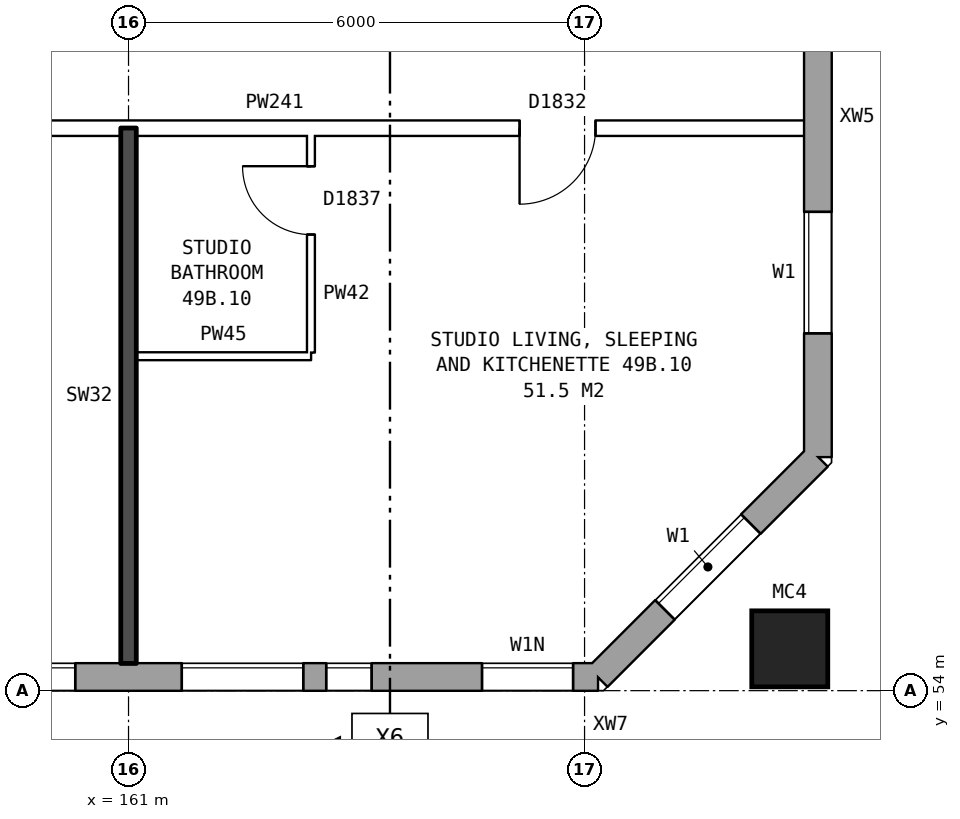
"""IFC4 building model, lengths in metres.
Left out: names, types, materials, properties, quantities, classifications, styles, units other than length and angle.
Written with IfcOpenShell. Run it as: python <this file> out.ifc"""

import sys

from ifc_helpers import new_model, si_unit, direction, frame, frame_2d, origin, origin_2d, place, context, subcontext, project, spatial, rectangle, hollow_rectangle, extrude, element, fill, save


model = new_model("IFC4")
c1 = context("Model", 3, precision=1e-05, world=origin(), true_north=direction((0.0, 1.0)))
c2 = subcontext(c1, "Body", "Model", "MODEL_VIEW")
j1 = project(units=[si_unit("LENGTHUNIT", "METRE"), si_unit("PLANEANGLEUNIT", "RADIAN")], contexts=[c1])
p1 = place(None, origin())
s1 = spatial("IfcSite", under=j1, at=p1, CompositionType="ELEMENT")
p2 = place(p1, origin())
s2 = spatial("IfcBuilding", under=s1, at=p2, CompositionType="ELEMENT")
p3 = place(p2, frame((0.0, 0.0, 175.8)))
s3 = spatial("IfcBuildingStorey", under=s2, at=p3, CompositionType="ELEMENT", Elevation=175.8)
p4 = place(p3, frame((169.7, 54.55, 0.0), z_axis=(0.0, 0.0, 1.0), x_axis=(1.0, 0.0, 0.0)))
e1 = element("IfcColumn", 1, at=p4, inside=s3, PredefinedType="COLUMN", context=c2, shape_type="SweptSolid", body=[
    extrude(hollow_rectangle(XDim=1.0, YDim=1.0, WallThickness=0.055, at=origin_2d()), origin(), (0.0, 0.0, 1.0), 3.1),
])
p5 = place(p3, frame((134.075, 54.18, 0.0), z_axis=(0.0, 0.0, 1.0), x_axis=(1.0, 0.0, 0.0)))
e2 = element("IfcWall", 2, at=p5, inside=s3, PredefinedType="STANDARD", context=c2, shape_type="SweptSolid", body=[
    extrude(rectangle(XDim=33.101, YDim=0.36, at=frame_2d((16.55, 0.0))), origin(), (0.0, 0.0, 1.0), 2.85),
])
p6 = place(p5, frame((0.3, 0.0, 0.8)))
e3 = element("IfcOpeningElement", 3, at=p6, cuts=e2, PredefinedType="OPENING", context=c2, shape_type="SweptSolid", body=[
    extrude(rectangle(XDim=0.6, YDim=1.8, at=frame_2d((0.3, 0.9))), frame((0.0, 0.19, 0.0), z_axis=(0.0, -1.0, 0.0), x_axis=(1.0, 0.0, 0.0)), (0.0, 0.0, 1.0), 0.38),
])
p7 = place(p5, frame((3.625, 0.0, 0.8)))
e4 = element("IfcOpeningElement", 4, at=p7, cuts=e2, PredefinedType="OPENING", context=c2, shape_type="SweptSolid", body=[
    extrude(rectangle(XDim=1.6, YDim=1.8, at=frame_2d((0.8, 0.9))), frame((0.0, 0.19, 0.0), z_axis=(0.0, -1.0, 0.0), x_axis=(1.0, 0.0, 0.0)), (0.0, 0.0, 1.0), 0.38),
])
p8 = place(p5, frame((6.625, 0.0, 0.8)))
e5 = element("IfcOpeningElement", 5, at=p8, cuts=e2, PredefinedType="OPENING", context=c2, shape_type="SweptSolid", body=[
    extrude(rectangle(XDim=1.6, YDim=1.8, at=frame_2d((0.8, 0.9))), frame((0.0, 0.19, 0.0), z_axis=(0.0, -1.0, 0.0), x_axis=(1.0, 0.0, 0.0)), (0.0, 0.0, 1.0), 0.38),
])
p9 = place(p5, frame((9.625, 0.0, 0.8)))
e6 = element("IfcOpeningElement", 6, at=p9, cuts=e2, PredefinedType="OPENING", context=c2, shape_type="SweptSolid", body=[
    extrude(rectangle(XDim=1.6, YDim=1.8, at=frame_2d((0.8, 0.9))), frame((0.0, 0.19, 0.0), z_axis=(0.0, -1.0, 0.0), x_axis=(1.0, 0.0, 0.0)), (0.0, 0.0, 1.0), 0.38),
])
p10 = place(p5, frame((12.625, 0.0, 0.8)))
e7 = element("IfcOpeningElement", 7, at=p10, cuts=e2, PredefinedType="OPENING", context=c2, shape_type="SweptSolid", body=[
    extrude(rectangle(XDim=1.6, YDim=1.8, at=frame_2d((0.8, 0.9))), frame((0.0, 0.19, 0.0), z_axis=(0.0, -1.0, 0.0), x_axis=(1.0, 0.0, 0.0)), (0.0, 0.0, 1.0), 0.38),
])
p11 = place(p5, frame((15.625, 0.0, 0.8)))
e8 = element("IfcOpeningElement", 8, at=p11, cuts=e2, PredefinedType="OPENING", context=c2, shape_type="SweptSolid", body=[
    extrude(rectangle(XDim=1.6, YDim=1.8, at=frame_2d((0.8, 0.9))), frame((0.0, 0.19, 0.0), z_axis=(0.0, -1.0, 0.0), x_axis=(1.0, 0.0, 0.0)), (0.0, 0.0, 1.0), 0.38),
])
p12 = place(p5, frame((18.625, 0.0, 0.8)))
e9 = element("IfcOpeningElement", 9, at=p12, cuts=e2, PredefinedType="OPENING", context=c2, shape_type="SweptSolid", body=[
    extrude(rectangle(XDim=1.6, YDim=1.8, at=frame_2d((0.8, 0.9))), frame((0.0, 0.19, 0.0), z_axis=(0.0, -1.0, 0.0), x_axis=(1.0, 0.0, 0.0)), (0.0, 0.0, 1.0), 0.38),
])
p13 = place(p5, frame((21.625, 0.0, 0.8)))
e10 = element("IfcOpeningElement", 10, at=p13, cuts=e2, PredefinedType="OPENING", context=c2, shape_type="SweptSolid", body=[
    extrude(rectangle(XDim=1.6, YDim=1.8, at=frame_2d((0.8, 0.9))), frame((0.0, 0.19, 0.0), z_axis=(0.0, -1.0, 0.0), x_axis=(1.0, 0.0, 0.0)), (0.0, 0.0, 1.0), 0.38),
])
p14 = place(p5, frame((24.625, 0.0, 0.8)))
e11 = element("IfcOpeningElement", 11, at=p14, cuts=e2, PredefinedType="OPENING", context=c2, shape_type="SweptSolid", body=[
    extrude(rectangle(XDim=1.6, YDim=1.8, at=frame_2d((0.8, 0.9))), frame((0.0, 0.19, 0.0), z_axis=(0.0, -1.0, 0.0), x_axis=(1.0, 0.0, 0.0)), (0.0, 0.0, 1.0), 0.38),
])
p15 = place(p5, frame((27.625, 0.0, 0.8)))
e12 = element("IfcOpeningElement", 12, at=p15, cuts=e2, PredefinedType="OPENING", context=c2, shape_type="SweptSolid", body=[
    extrude(rectangle(XDim=1.6, YDim=1.8, at=frame_2d((0.8, 0.9))), frame((0.0, 0.19, 0.0), z_axis=(0.0, -1.0, 0.0), x_axis=(1.0, 0.0, 0.0)), (0.0, 0.0, 1.0), 0.38),
])
p16 = place(p5, frame((29.525, 0.0, 0.8)))
e13 = element("IfcOpeningElement", 13, at=p16, cuts=e2, PredefinedType="OPENING", context=c2, shape_type="SweptSolid", body=[
    extrude(rectangle(XDim=0.6, YDim=0.9, at=frame_2d((0.3, 0.45))), frame((0.0, 0.19, 0.0), z_axis=(0.0, -1.0, 0.0), x_axis=(1.0, 0.0, 0.0)), (0.0, 0.0, 1.0), 0.38),
])
p17 = place(p5, frame((1.2, 0.0, 1.7)))
e14 = element("IfcOpeningElement", 14, at=p17, cuts=e2, PredefinedType="OPENING", context=c2, shape_type="SweptSolid", body=[
    extrude(rectangle(XDim=0.6, YDim=0.9, at=frame_2d((0.3, 0.45))), frame((0.0, 0.19, 0.0), z_axis=(0.0, -1.0, 0.0), x_axis=(1.0, 0.0, 0.0)), (0.0, 0.0, 1.0), 0.38),
])
p18 = place(p5, frame((31.575, 0.0, 1.4)))
e15 = element("IfcOpeningElement", 15, at=p18, cuts=e2, PredefinedType="OPENING", context=c2, shape_type="SweptSolid", body=[
    extrude(rectangle(XDim=1.2, YDim=1.2, at=frame_2d((0.6, 0.6))), frame((0.0, 0.19, 0.0), z_axis=(0.0, -1.0, 0.0), x_axis=(1.0, 0.0, 0.0)), (0.0, 0.0, 1.0), 0.38),
])
p19 = place(p3, frame((167.175, 54.18, 0.0), z_axis=(0.0, 0.0, 1.0), x_axis=(0.707106781187, 0.707106781187, 0.0)))
e16 = element("IfcWall", 16, at=p19, inside=s3, PredefinedType="STANDARD", context=c2, shape_type="SweptSolid", body=[
    extrude(rectangle(XDim=4.094, YDim=0.36, at=frame_2d((2.047, 0.0))), origin(), (0.0, 0.0, 1.0), 2.85),
])
p20 = place(p19, frame((1.247, 0.0, 0.8)))
e17 = element("IfcOpeningElement", 17, at=p20, cuts=e16, PredefinedType="OPENING", context=c2, shape_type="SweptSolid", body=[
    extrude(rectangle(XDim=1.6, YDim=1.8, at=frame_2d((0.8, 0.9))), frame((0.0, 0.19, 0.0), z_axis=(0.0, -1.0, 0.0), x_axis=(1.0, 0.0, 0.0)), (0.0, 0.0, 1.0), 0.38),
])
p21 = place(p3, frame((170.07, 57.075, 0.0), z_axis=(0.0, 0.0, 1.0), x_axis=(0.0, 1.0, 0.0)))
e18 = element("IfcWall", 18, at=p21, inside=s3, PredefinedType="STANDARD", context=c2, shape_type="SweptSolid", body=[
    extrude(rectangle(XDim=25.851, YDim=0.36, at=frame_2d((12.925, 0.0))), origin(), (0.0, 0.0, 1.0), 2.85),
])
p22 = place(p21, frame((1.625, 0.0, 0.8)))
e19 = element("IfcOpeningElement", 19, at=p22, cuts=e18, PredefinedType="OPENING", context=c2, shape_type="SweptSolid", body=[
    extrude(rectangle(XDim=1.6, YDim=1.8, at=frame_2d((0.8, 0.9))), frame((0.0, 0.19, 0.0), z_axis=(0.0, -1.0, 0.0), x_axis=(1.0, 0.0, 0.0)), (0.0, 0.0, 1.0), 0.38),
])
p23 = place(p21, frame((5.725, 0.0, 0.8)))
e20 = element("IfcOpeningElement", 20, at=p23, cuts=e18, PredefinedType="OPENING", context=c2, shape_type="SweptSolid", body=[
    extrude(rectangle(XDim=1.6, YDim=0.9, at=frame_2d((0.8, 0.45))), frame((0.0, 0.19, 0.0), z_axis=(0.0, -1.0, 0.0), x_axis=(1.0, 0.0, 0.0)), (0.0, 0.0, 1.0), 0.38),
])
p24 = place(p21, frame((7.625, 0.0, 0.8)))
e21 = element("IfcOpeningElement", 21, at=p24, cuts=e18, PredefinedType="OPENING", context=c2, shape_type="SweptSolid", body=[
    extrude(rectangle(XDim=1.6, YDim=1.8, at=frame_2d((0.8, 0.9))), frame((0.0, 0.19, 0.0), z_axis=(0.0, -1.0, 0.0), x_axis=(1.0, 0.0, 0.0)), (0.0, 0.0, 1.0), 0.38),
])
p25 = place(p21, frame((10.625, 0.0, 0.8)))
e22 = element("IfcOpeningElement", 22, at=p25, cuts=e18, PredefinedType="OPENING", context=c2, shape_type="SweptSolid", body=[
    extrude(rectangle(XDim=1.6, YDim=1.8, at=frame_2d((0.8, 0.9))), frame((0.0, 0.19, 0.0), z_axis=(0.0, -1.0, 0.0), x_axis=(1.0, 0.0, 0.0)), (0.0, 0.0, 1.0), 0.38),
])
p26 = place(p21, frame((13.625, 0.0, 0.8)))
e23 = element("IfcOpeningElement", 23, at=p26, cuts=e18, PredefinedType="OPENING", context=c2, shape_type="SweptSolid", body=[
    extrude(rectangle(XDim=1.6, YDim=1.8, at=frame_2d((0.8, 0.9))), frame((0.0, 0.19, 0.0), z_axis=(0.0, -1.0, 0.0), x_axis=(1.0, 0.0, 0.0)), (0.0, 0.0, 1.0), 0.38),
])
p27 = place(p21, frame((16.625, 0.0, 0.8)))
e24 = element("IfcOpeningElement", 24, at=p27, cuts=e18, PredefinedType="OPENING", context=c2, shape_type="SweptSolid", body=[
    extrude(rectangle(XDim=1.6, YDim=1.8, at=frame_2d((0.8, 0.9))), frame((0.0, 0.19, 0.0), z_axis=(0.0, -1.0, 0.0), x_axis=(1.0, 0.0, 0.0)), (0.0, 0.0, 1.0), 0.38),
])
p28 = place(p21, frame((9.525, 0.0, 0.8)))
e25 = element("IfcOpeningElement", 25, at=p28, cuts=e18, PredefinedType="OPENING", context=c2, shape_type="SweptSolid", body=[
    extrude(rectangle(XDim=0.8, YDim=1.8, at=frame_2d((0.4, 0.9))), frame((0.0, 0.19, 0.0), z_axis=(0.0, -1.0, 0.0), x_axis=(1.0, 0.0, 0.0)), (0.0, 0.0, 1.0), 0.38),
])
p29 = place(p21, frame((22.625, 0.0, 0.8)))
e26 = element("IfcOpeningElement", 26, at=p29, cuts=e18, PredefinedType="OPENING", context=c2, shape_type="SweptSolid", body=[
    extrude(rectangle(XDim=1.6, YDim=1.8, at=frame_2d((0.8, 0.9))), frame((0.0, 0.19, 0.0), z_axis=(0.0, -1.0, 0.0), x_axis=(1.0, 0.0, 0.0)), (0.0, 0.0, 1.0), 0.38),
])
p30 = place(p21, frame((12.525, 0.0, 0.8)))
e27 = element("IfcOpeningElement", 27, at=p30, cuts=e18, PredefinedType="OPENING", context=c2, shape_type="SweptSolid", body=[
    extrude(rectangle(XDim=0.8, YDim=1.8, at=frame_2d((0.4, 0.9))), frame((0.0, 0.19, 0.0), z_axis=(0.0, -1.0, 0.0), x_axis=(1.0, 0.0, 0.0)), (0.0, 0.0, 1.0), 0.38),
])
p31 = place(p21, frame((15.525, 0.0, 0.8)))
e28 = element("IfcOpeningElement", 28, at=p31, cuts=e18, PredefinedType="OPENING", context=c2, shape_type="SweptSolid", body=[
    extrude(rectangle(XDim=0.8, YDim=1.8, at=frame_2d((0.4, 0.9))), frame((0.0, 0.19, 0.0), z_axis=(0.0, -1.0, 0.0), x_axis=(1.0, 0.0, 0.0)), (0.0, 0.0, 1.0), 0.38),
])
p32 = place(p21, frame((18.525, 0.0, 0.8)))
e29 = element("IfcOpeningElement", 29, at=p32, cuts=e18, PredefinedType="OPENING", context=c2, shape_type="SweptSolid", body=[
    extrude(rectangle(XDim=1.6, YDim=0.9, at=frame_2d((0.8, 0.45))), frame((0.0, 0.19, 0.0), z_axis=(0.0, -1.0, 0.0), x_axis=(1.0, 0.0, 0.0)), (0.0, 0.0, 1.0), 0.38),
])
p33 = place(p3, frame((161.1, 58.4, 0.0), z_axis=(0.0, 0.0, 1.0), x_axis=(1.0, 0.0, 0.0)))
e30 = element("IfcWall", 30, at=p33, inside=s3, PredefinedType="PARTITIONING", context=c2, shape_type="SweptSolid", body=[
    extrude(rectangle(XDim=2.3, YDim=0.1, at=frame_2d((1.15, 0.0))), origin(), (0.0, 0.0, 1.0), 2.85),
])
p34 = place(p3, frame((155.1, 61.4, 0.0), z_axis=(0.0, 0.0, 1.0), x_axis=(1.0, 0.0, 0.0)))
e31 = element("IfcWall", 31, at=p34, inside=s3, PredefinedType="PARTITIONING", context=c2, shape_type="SweptSolid", body=[
    extrude(rectangle(XDim=14.79, YDim=0.2, at=frame_2d((7.395, 0.0))), origin(), (0.0, 0.0, 1.0), 2.85),
])
p35 = place(p34, frame((3.6, 0.0, 0.0)))
e32 = element("IfcOpeningElement", 32, at=p35, cuts=e31, PredefinedType="OPENING", context=c2, shape_type="SweptSolid", body=[
    extrude(rectangle(XDim=1.0, YDim=2.1, at=frame_2d((0.5, 1.05))), frame((0.0, 0.11, 0.0), z_axis=(0.0, -1.0, 0.0), x_axis=(1.0, 0.0, 0.0)), (0.0, 0.0, 1.0), 0.22),
])
p36 = place(p34, frame((11.045, 0.0, 0.0)))
e33 = element("IfcOpeningElement", 33, at=p36, cuts=e31, PredefinedType="OPENING", context=c2, shape_type="SweptSolid", body=[
    extrude(rectangle(XDim=1.0, YDim=2.1, at=frame_2d((0.5, 1.05))), frame((0.0, 0.11, 0.0), z_axis=(0.0, -1.0, 0.0), x_axis=(1.0, 0.0, 0.0)), (0.0, 0.0, 1.0), 0.22),
])
p37 = place(p3, frame((161.0, 54.36, 0.0), z_axis=(0.0, 0.0, 1.0), x_axis=(0.0, 1.0, 0.0)))
e34 = element("IfcWall", 34, at=p37, inside=s3, PredefinedType="SOLIDWALL", context=c2, shape_type="SweptSolid", body=[
    extrude(rectangle(XDim=7.04, YDim=0.2, at=frame_2d((3.52, 0.0))), origin(), (0.0, 0.0, 1.0), 2.85),
])
p38 = place(p3, frame((163.4, 58.45, 0.0), z_axis=(0.0, 0.0, 1.0), x_axis=(0.0, 1.0, 0.0)))
e35 = element("IfcWall", 35, at=p38, inside=s3, PredefinedType="PARTITIONING", context=c2, shape_type="SweptSolid", body=[
    extrude(rectangle(XDim=2.85, YDim=0.1, at=frame_2d((1.425, 0.0))), origin(), (0.0, 0.0, 1.0), 2.85),
])
p39 = place(p38, frame((1.55, 0.0, 0.0)))
e36 = element("IfcOpeningElement", 36, at=p39, cuts=e35, PredefinedType="OPENING", context=c2, shape_type="SweptSolid", body=[
    extrude(rectangle(XDim=0.9, YDim=2.1, at=frame_2d((0.45, 1.05))), frame((0.0, 0.06, 0.0), z_axis=(0.0, -1.0, 0.0), x_axis=(1.0, 0.0, 0.0)), (0.0, 0.0, 1.0), 0.12),
])
p40 = place(p14, origin())
e37 = element("IfcWindow", 37, at=p40, inside=s3, PartitioningType="SINGLE_PANEL", PredefinedType="WINDOW", context=c2, shape_type="SweptSolid", body=[
    extrude(rectangle(XDim=1.6, YDim=1.8, at=frame_2d((0.8, 0.9))), frame((0.0, 0.15, 0.0), z_axis=(0.0, -1.0, 0.0), x_axis=(1.0, 0.0, 0.0)), (0.0, 0.0, 1.0), 0.06),
])
fill(e11, e37)
p41 = place(p15, origin())
e38 = element("IfcWindow", 38, at=p41, inside=s3, PartitioningType="SINGLE_PANEL", PredefinedType="WINDOW", context=c2, shape_type="SweptSolid", body=[
    extrude(rectangle(XDim=1.6, YDim=1.8, at=frame_2d((0.8, 0.9))), frame((0.0, 0.15, 0.0), z_axis=(0.0, -1.0, 0.0), x_axis=(1.0, 0.0, 0.0)), (0.0, 0.0, 1.0), 0.06),
])
fill(e12, e38)
p42 = place(p16, origin())
e39 = element("IfcWindow", 39, at=p42, inside=s3, PartitioningType="SINGLE_PANEL", PredefinedType="WINDOW", context=c2, shape_type="SweptSolid", body=[
    extrude(rectangle(XDim=0.6, YDim=0.9, at=frame_2d((0.3, 0.45))), frame((0.0, 0.15, 0.0), z_axis=(0.0, -1.0, 0.0), x_axis=(1.0, 0.0, 0.0)), (0.0, 0.0, 1.0), 0.06),
])
fill(e13, e39)
p43 = place(p20, origin())
e40 = element("IfcWindow", 40, at=p43, inside=s3, PartitioningType="SINGLE_PANEL", PredefinedType="WINDOW", context=c2, shape_type="SweptSolid", body=[
    extrude(rectangle(XDim=1.6, YDim=1.8, at=frame_2d((0.8, 0.9))), frame((0.0, 0.15, 0.0), z_axis=(0.0, -1.0, 0.0), x_axis=(1.0, 0.0, 0.0)), (0.0, 0.0, 1.0), 0.06),
])
fill(e17, e40)
p44 = place(p22, origin())
e41 = element("IfcWindow", 41, at=p44, inside=s3, PartitioningType="SINGLE_PANEL", PredefinedType="WINDOW", context=c2, shape_type="SweptSolid", body=[
    extrude(rectangle(XDim=1.6, YDim=1.8, at=frame_2d((0.8, 0.9))), frame((0.0, 0.15, 0.0), z_axis=(0.0, -1.0, 0.0), x_axis=(1.0, 0.0, 0.0)), (0.0, 0.0, 1.0), 0.06),
])
fill(e19, e41)
p45 = place(p36, frame((1.0, 0.0, 0.0), z_axis=(0.0, 0.0, 1.0), x_axis=(-1.0, 0.0, 0.0)))
e42 = element("IfcDoor", 42, at=p45, inside=s3, OperationType="SINGLE_SWING_RIGHT", PredefinedType="DOOR", context=c2, shape_type="SweptSolid", body=[
    extrude(rectangle(XDim=1.0, YDim=2.1, at=frame_2d((0.5, 1.05))), frame((0.0, 0.025, 0.0), z_axis=(0.0, -1.0, 0.0), x_axis=(1.0, 0.0, 0.0)), (0.0, 0.0, 1.0), 0.05),
])
fill(e33, e42)
p46 = place(p39, origin())
e43 = element("IfcDoor", 43, at=p46, inside=s3, OperationType="SINGLE_SWING_RIGHT", PredefinedType="DOOR", context=c2, shape_type="SweptSolid", body=[
    extrude(rectangle(XDim=0.9, YDim=2.1, at=frame_2d((0.45, 1.05))), frame((0.0, 0.025, 0.0), z_axis=(0.0, -1.0, 0.0), x_axis=(1.0, 0.0, 0.0)), (0.0, 0.0, 1.0), 0.05),
])
fill(e36, e43)
p47 = place(p18, origin())
e44 = element("IfcWindow", 44, at=p47, inside=s3, PartitioningType="SINGLE_PANEL", PredefinedType="WINDOW", context=c2, shape_type="SweptSolid", body=[
    extrude(rectangle(XDim=1.2, YDim=1.2, at=frame_2d((0.6, 0.6))), frame((0.0, 0.15, 0.0), z_axis=(0.0, -1.0, 0.0), x_axis=(1.0, 0.0, 0.0)), (0.0, 0.0, 1.0), 0.06),
])
fill(e15, e44)
save(model, sys.argv[1])
